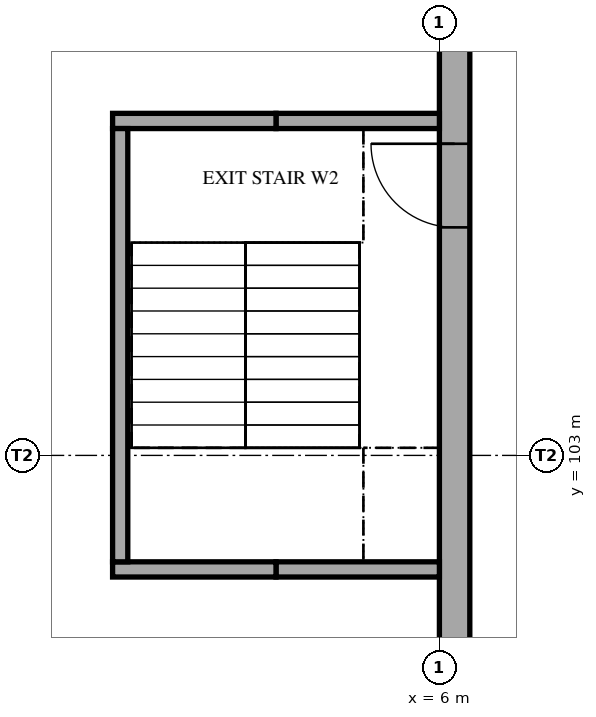
"""IFC4 building model, lengths in metres.
Left out: names, types, materials, properties, quantities, classifications, styles, units other than length and angle.
Written with IfcOpenShell. Run it as: python <this file> out.ifc"""

import sys

from ifc_helpers import new_model, si_unit, direction, frame, frame_2d, origin, place, context, subcontext, project, spatial, rectangle, extrude, element, fill, save


model = new_model("IFC4")
c1 = context("Model", 3, precision=1e-05, world=origin(), true_north=direction((0.0, 1.0)))
c2 = subcontext(c1, "Body", "Model", "MODEL_VIEW")
j1 = project(units=[si_unit("LENGTHUNIT", "METRE"), si_unit("PLANEANGLEUNIT", "RADIAN")], contexts=[c1])
p1 = place(None, origin())
s1 = spatial("IfcSite", under=j1, at=p1, CompositionType="ELEMENT")
p2 = place(p1, origin())
s2 = spatial("IfcBuilding", under=s1, at=p2, CompositionType="ELEMENT")
p3 = place(p2, frame((0.0, 0.0, -8.4)))
s3 = spatial("IfcBuildingStorey", under=s2, at=p3, CompositionType="ELEMENT", Elevation=-8.4)
p4 = place(p3, frame((6.2, 100.5, 0.0), z_axis=(0.0, 0.0, 1.0), x_axis=(0.0, 1.0, 0.0)))
e1 = element("IfcWall", 1, at=p4, inside=s3, PredefinedType="SOLIDWALL", context=c2, shape_type="SweptSolid", body=[
    extrude(rectangle(XDim=7.9, YDim=0.4, at=frame_2d((3.95, 0.0))), origin(), (0.0, 0.0, 1.0), 4.2),
])
p5 = place(p4, frame((5.5, 0.0, 0.0)))
e2 = element("IfcOpeningElement", 2, at=p5, cuts=e1, PredefinedType="OPENING", context=c2, shape_type="SweptSolid", body=[
    extrude(rectangle(XDim=1.1, YDim=2.1, at=frame_2d((0.55, 1.05))), frame((0.0, 0.21, 0.0), z_axis=(0.0, -1.0, 0.0), x_axis=(1.0, 0.0, 0.0)), (0.0, 0.0, 1.0), 0.42),
])
p6 = place(p3, frame((6.0, 107.4, 0.0), z_axis=(0.0, 0.0, 1.0), x_axis=(-1.0, 0.0, 0.0)))
e3 = element("IfcWall", 3, at=p6, inside=s3, PredefinedType="SOLIDWALL", context=c2, shape_type="SweptSolid", body=[
    extrude(rectangle(XDim=2.15, YDim=0.2, at=frame_2d((1.075, 0.0))), origin(), (0.0, 0.0, 1.0), 4.2),
])
p7 = place(p3, frame((3.85, 107.4, 0.0), z_axis=(0.0, 0.0, 1.0), x_axis=(-1.0, 0.0, 0.0)))
e4 = element("IfcWall", 4, at=p7, inside=s3, PredefinedType="SOLIDWALL", context=c2, shape_type="SweptSolid", body=[
    extrude(rectangle(XDim=2.15, YDim=0.2, at=frame_2d((1.075, 0.0))), origin(), (0.0, 0.0, 1.0), 4.2),
])
p8 = place(p3, frame((6.0, 101.5, 0.0), z_axis=(0.0, 0.0, 1.0), x_axis=(-1.0, 0.0, 0.0)))
e5 = element("IfcWall", 5, at=p8, inside=s3, PredefinedType="SOLIDWALL", context=c2, shape_type="SweptSolid", body=[
    extrude(rectangle(XDim=2.15, YDim=0.2, at=frame_2d((1.075, 0.0))), origin(), (0.0, 0.0, 1.0), 4.2),
])
p9 = place(p3, frame((3.85, 101.5, 0.0), z_axis=(0.0, 0.0, 1.0), x_axis=(-1.0, 0.0, 0.0)))
e6 = element("IfcWall", 6, at=p9, inside=s3, PredefinedType="SOLIDWALL", context=c2, shape_type="SweptSolid", body=[
    extrude(rectangle(XDim=2.15, YDim=0.2, at=frame_2d((1.075, 0.0))), origin(), (0.0, 0.0, 1.0), 4.2),
])
p10 = place(p3, frame((1.8, 107.3, 0.0), z_axis=(0.0, 0.0, 1.0), x_axis=(0.0, -1.0, 0.0)))
e7 = element("IfcWall", 7, at=p10, inside=s3, PredefinedType="SOLIDWALL", context=c2, shape_type="SweptSolid", body=[
    extrude(rectangle(XDim=5.7, YDim=0.2, at=frame_2d((2.85, 0.0))), origin(), (0.0, 0.0, 1.0), 4.2),
])
p11 = place(p5, origin())
e8 = element("IfcDoor", 8, at=p11, inside=s3, OperationType="SINGLE_SWING_RIGHT", PredefinedType="DOOR", context=c2, shape_type="SweptSolid", body=[
    extrude(rectangle(XDim=1.1, YDim=2.1, at=frame_2d((0.55, 1.05))), frame((0.0, 0.025, 0.0), z_axis=(0.0, -1.0, 0.0), x_axis=(1.0, 0.0, 0.0)), (0.0, 0.0, 1.0), 0.05),
])
fill(e2, e8)
save(model, sys.argv[1])
